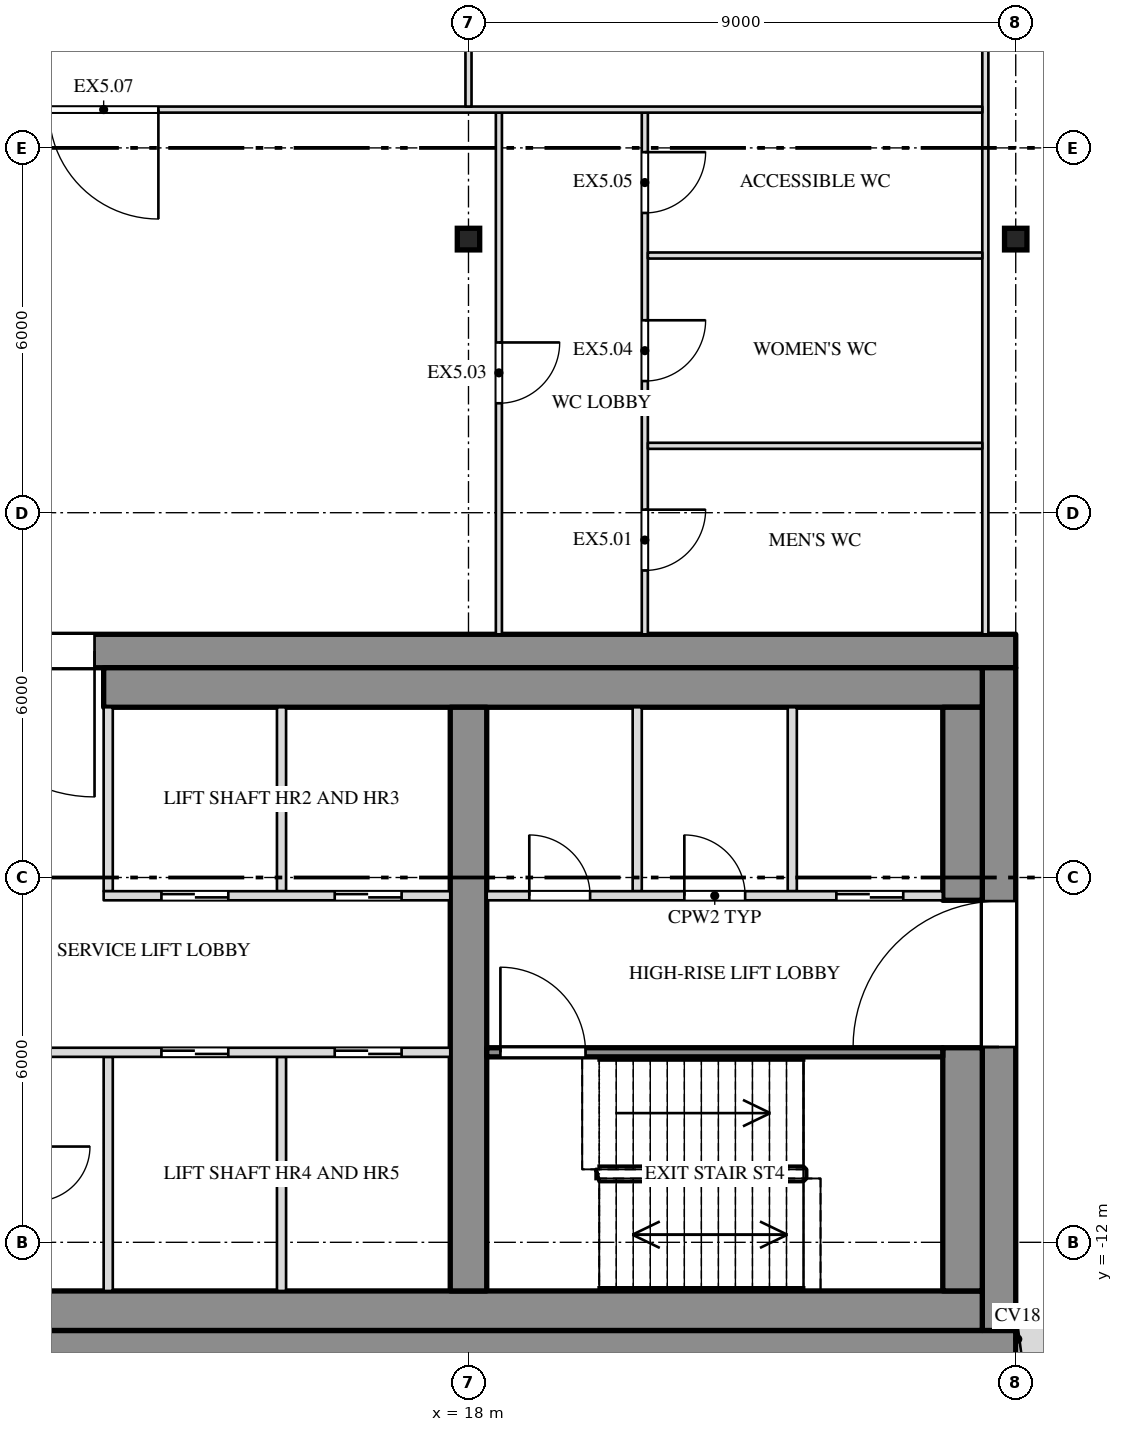
"""IFC4 building model, lengths in metres.
Left out: names, types, materials, properties, quantities, classifications, styles, units other than length and angle.
Written with IfcOpenShell. Run it as: python <this file> out.ifc"""

import sys

from ifc_helpers import new_model, si_unit, direction, frame, frame_2d, origin, origin_2d, place, context, subcontext, project, spatial, rectangle, i_section, extrude, element, fill, save


model = new_model("IFC4")
c1 = context("Model", 3, precision=1e-05, world=origin(), true_north=direction((0.0, 1.0)))
c2 = subcontext(c1, "Body", "Model", "MODEL_VIEW")
j1 = project(units=[si_unit("LENGTHUNIT", "METRE"), si_unit("PLANEANGLEUNIT", "RADIAN")], contexts=[c1])
p1 = place(None, origin())
s1 = spatial("IfcSite", under=j1, at=p1, CompositionType="ELEMENT")
p2 = place(p1, origin())
s2 = spatial("IfcBuilding", under=s1, at=p2, CompositionType="ELEMENT")
p3 = place(p2, frame((0.0, 0.0, 288.5)))
s3 = spatial("IfcBuildingStorey", under=s2, at=p3, CompositionType="ELEMENT", Elevation=288.5)
for number, where, z_axis, x_axis in (
    (1, (18.0, 4.5, 0.0), (0.0, 0.0, 1.0), (1.0, 0.0, 0.0)),
    (2, (27.0, 4.5, 0.0), (0.0, 0.0, 1.0), (1.0, 0.0, 0.0)),
):
    element("IfcColumn", number, at=place(p3, frame(where, z_axis=z_axis, x_axis=x_axis)), inside=s3, PredefinedType="COLUMN", context=c2, shape_type="SweptSolid", body=[
        extrude(i_section(OverallWidth=0.368, OverallDepth=0.356, WebThickness=0.011, FlangeThickness=0.018, at=origin_2d()), origin(), (0.0, 0.0, 1.0), 4.0),
    ])
p4 = place(p3, frame((-27.0, -2.275, 0.0), z_axis=(0.0, 0.0, 1.0), x_axis=(1.0, 0.0, 0.0)))
e3 = element("IfcWall", 3, at=p4, inside=s3, PredefinedType="SHEAR", context=c2, shape_type="SweptSolid", body=[
    extrude(rectangle(XDim=54.0, YDim=0.55, at=frame_2d((27.0, 0.0))), origin(), (0.0, 0.0, 1.0), 3.78),
])
p5 = place(p4, frame((15.15, 0.0, 0.0)))
e4 = element("IfcOpeningElement", 4, at=p5, cuts=e3, PredefinedType="OPENING", context=c2, shape_type="SweptSolid", body=[
    extrude(rectangle(XDim=2.4, YDim=2.1, at=frame_2d((1.2, 1.05))), frame((0.0, 0.287, 0.0), z_axis=(0.0, -1.0, 0.0), x_axis=(1.0, 0.0, 0.0)), (0.0, 0.0, 1.0), 0.574),
])
p6 = place(p4, frame((36.45, 0.0, 0.0)))
e5 = element("IfcOpeningElement", 5, at=p6, cuts=e3, PredefinedType="OPENING", context=c2, shape_type="SweptSolid", body=[
    extrude(rectangle(XDim=2.4, YDim=2.1, at=frame_2d((1.2, 1.05))), frame((0.0, 0.287, 0.0), z_axis=(0.0, -1.0, 0.0), x_axis=(1.0, 0.0, 0.0)), (0.0, 0.0, 1.0), 0.574),
])
p7 = place(p3, frame((-27.0, -13.725, 0.0), z_axis=(0.0, 0.0, 1.0), x_axis=(1.0, 0.0, 0.0)))
e6 = element("IfcWall", 6, at=p7, inside=s3, PredefinedType="SHEAR", context=c2, shape_type="SweptSolid", body=[
    extrude(rectangle(XDim=54.0, YDim=0.55, at=frame_2d((27.0, 0.0))), origin(), (0.0, 0.0, 1.0), 3.78),
])
p8 = place(p3, frame((26.725, -13.45, 0.0), z_axis=(0.0, 0.0, 1.0), x_axis=(0.0, 1.0, 0.0)))
e7 = element("IfcWall", 7, at=p8, inside=s3, PredefinedType="SHEAR", context=c2, shape_type="SweptSolid", body=[
    extrude(rectangle(XDim=10.9, YDim=0.55, at=frame_2d((5.45, 0.0))), origin(), (0.0, 0.0, 1.0), 3.78),
])
p9 = place(p8, frame((4.662, 0.0, 0.0)))
e8 = element("IfcOpeningElement", 8, at=p9, cuts=e7, PredefinedType="OPENING", context=c2, shape_type="SweptSolid", body=[
    extrude(rectangle(XDim=2.4, YDim=2.1, at=frame_2d((1.2, 1.05))), frame((0.0, 0.287, 0.0), z_axis=(0.0, -1.0, 0.0), x_axis=(1.0, 0.0, 0.0)), (0.0, 0.0, 1.0), 0.574),
])
p10 = place(p3, frame((12.0, -2.875, 0.0), z_axis=(0.0, 0.0, 1.0), x_axis=(1.0, 0.0, 0.0)))
e9 = element("IfcWall", 9, at=p10, inside=s3, PredefinedType="SHEAR", context=c2, shape_type="SweptSolid", body=[
    extrude(rectangle(XDim=14.45, YDim=0.65, at=frame_2d((7.225, 0.0))), origin(), (0.0, 0.0, 1.0), 3.78),
])
p11 = place(p3, frame((-26.45, -13.125, 0.0), z_axis=(0.0, 0.0, 1.0), x_axis=(1.0, 0.0, 0.0)))
e10 = element("IfcWall", 10, at=p11, inside=s3, PredefinedType="SHEAR", context=c2, shape_type="SweptSolid", body=[
    extrude(rectangle(XDim=52.9, YDim=0.65, at=frame_2d((26.45, 0.0))), origin(), (0.0, 0.0, 1.0), 3.78),
])
p12 = place(p3, frame((26.125, -12.8, 0.0), z_axis=(0.0, 0.0, 1.0), x_axis=(0.0, 1.0, 0.0)))
e11 = element("IfcWall", 11, at=p12, inside=s3, PredefinedType="SHEAR", context=c2, shape_type="SweptSolid", body=[
    extrude(rectangle(XDim=4.0, YDim=0.65, at=frame_2d((2.0, 0.0))), origin(), (0.0, 0.0, 1.0), 3.78),
])
p13 = place(p3, frame((26.125, -6.375, 0.0), z_axis=(0.0, 0.0, 1.0), x_axis=(0.0, 1.0, 0.0)))
e12 = element("IfcWall", 12, at=p13, inside=s3, PredefinedType="SHEAR", context=c2, shape_type="SweptSolid", body=[
    extrude(rectangle(XDim=3.175, YDim=0.65, at=frame_2d((1.587, 0.0))), origin(), (0.0, 0.0, 1.0), 3.78),
])
p14 = place(p3, frame((18.0, -12.8, 0.0), z_axis=(0.0, 0.0, 1.0), x_axis=(0.0, 1.0, 0.0)))
e13 = element("IfcWall", 13, at=p14, inside=s3, PredefinedType="SHEAR", context=c2, shape_type="SweptSolid", body=[
    extrude(rectangle(XDim=9.6, YDim=0.6, at=frame_2d((4.8, 0.0))), origin(), (0.0, 0.0, 1.0), 3.78),
])
p15 = place(p3, frame((18.5, -2.0, 0.0), z_axis=(0.0, 0.0, 1.0), x_axis=(0.0, 1.0, 0.0)))
e14 = element("IfcWall", 14, at=p15, inside=s3, PredefinedType="PARTITIONING", context=c2, shape_type="SweptSolid", body=[
    extrude(rectangle(XDim=8.58, YDim=0.1, at=frame_2d((4.29, 0.0))), origin(), (0.0, 0.0, 1.0), 3.78),
])
p16 = place(p15, frame((3.8, 0.0, 0.0)))
e15 = element("IfcOpeningElement", 15, at=p16, cuts=e14, PredefinedType="OPENING", context=c2, shape_type="SweptSolid", body=[
    extrude(rectangle(XDim=1.0, YDim=2.1, at=frame_2d((0.5, 1.05))), frame((0.0, 0.062, 0.0), z_axis=(0.0, -1.0, 0.0), x_axis=(1.0, 0.0, 0.0)), (0.0, 0.0, 1.0), 0.124),
])
p17 = place(p3, frame((20.9, -2.0, 0.0), z_axis=(0.0, 0.0, 1.0), x_axis=(0.0, 1.0, 0.0)))
e16 = element("IfcWall", 16, at=p17, inside=s3, PredefinedType="PARTITIONING", context=c2, shape_type="SweptSolid", body=[
    extrude(rectangle(XDim=8.58, YDim=0.1, at=frame_2d((4.29, 0.0))), origin(), (0.0, 0.0, 1.0), 3.78),
])
p18 = place(p17, frame((1.05, 0.0, 0.0)))
e17 = element("IfcOpeningElement", 17, at=p18, cuts=e16, PredefinedType="OPENING", context=c2, shape_type="SweptSolid", body=[
    extrude(rectangle(XDim=1.0, YDim=2.1, at=frame_2d((0.5, 1.05))), frame((0.0, 0.062, 0.0), z_axis=(0.0, -1.0, 0.0), x_axis=(1.0, 0.0, 0.0)), (0.0, 0.0, 1.0), 0.124),
])
p19 = place(p17, frame((4.165, 0.0, 0.0)))
e18 = element("IfcOpeningElement", 18, at=p19, cuts=e16, PredefinedType="OPENING", context=c2, shape_type="SweptSolid", body=[
    extrude(rectangle(XDim=1.0, YDim=2.1, at=frame_2d((0.5, 1.05))), frame((0.0, 0.062, 0.0), z_axis=(0.0, -1.0, 0.0), x_axis=(1.0, 0.0, 0.0)), (0.0, 0.0, 1.0), 0.124),
])
p20 = place(p17, frame((6.93, 0.0, 0.0)))
e19 = element("IfcOpeningElement", 19, at=p20, cuts=e16, PredefinedType="OPENING", context=c2, shape_type="SweptSolid", body=[
    extrude(rectangle(XDim=1.0, YDim=2.1, at=frame_2d((0.5, 1.05))), frame((0.0, 0.062, 0.0), z_axis=(0.0, -1.0, 0.0), x_axis=(1.0, 0.0, 0.0)), (0.0, 0.0, 1.0), 0.124),
])
p21 = place(p3, frame((26.5, -2.0, 0.0), z_axis=(0.0, 0.0, 1.0), x_axis=(0.0, 1.0, 0.0)))
e20 = element("IfcWall", 20, at=p21, inside=s3, PredefinedType="PARTITIONING", context=c2, shape_type="SweptSolid", body=[
    extrude(rectangle(XDim=23.19, YDim=0.1, at=frame_2d((11.595, 0.0))), origin(), (0.0, 0.0, 1.0), 3.78),
])
for number, where, z_axis, x_axis in (
    (21, (20.95, 1.1, 0.0), (0.0, 0.0, 1.0), (1.0, 0.0, 0.0)),
    (22, (20.95, 4.23, 0.0), (0.0, 0.0, 1.0), (1.0, 0.0, 0.0)),
):
    element("IfcWall", number, at=place(p3, frame(where, z_axis=z_axis, x_axis=x_axis)), inside=s3, PredefinedType="PARTITIONING", context=c2, shape_type="SweptSolid", body=[
        extrude(rectangle(XDim=5.5, YDim=0.1, at=frame_2d((2.75, 0.0))), origin(), (0.0, 0.0, 1.0), 3.78),
    ])
p22 = place(p3, frame((5.95, 6.63, 0.0), z_axis=(0.0, 0.0, 1.0), x_axis=(1.0, 0.0, 0.0)))
e23 = element("IfcWall", 23, at=p22, inside=s3, PredefinedType="PARTITIONING", context=c2, shape_type="SweptSolid", body=[
    extrude(rectangle(XDim=20.5, YDim=0.1, at=frame_2d((10.25, 0.0))), origin(), (0.0, 0.0, 1.0), 3.78),
])
p23 = place(p22, frame((5.15, 0.0, 0.0)))
e24 = element("IfcOpeningElement", 24, at=p23, cuts=e23, PredefinedType="OPENING", context=c2, shape_type="SweptSolid", body=[
    extrude(rectangle(XDim=1.8, YDim=2.1, at=frame_2d((0.9, 1.05))), frame((0.0, 0.062, 0.0), z_axis=(0.0, -1.0, 0.0), x_axis=(1.0, 0.0, 0.0)), (0.0, 0.0, 1.0), 0.124),
])
p24 = place(p3, frame((18.0, 6.68, 0.0), z_axis=(0.0, 0.0, 1.0), x_axis=(0.0, 1.0, 0.0)))
e25 = element("IfcWall", 25, at=p24, inside=s3, PredefinedType="PARTITIONING", context=c2, shape_type="SweptSolid", body=[
    extrude(rectangle(XDim=7.142, YDim=0.1, at=frame_2d((3.571, 0.0))), origin(), (0.0, 0.0, 1.0), 3.247),
])
p25 = place(p3, frame((27.059, -13.589, 0.0), z_axis=(0.0, 0.0, 1.0), x_axis=(0.991443199569, 0.13053881426, 0.0)))
e26 = element("IfcWall", 26, at=p25, inside=s3, PredefinedType="SOLIDWALL", context=c2, shape_type="SweptSolid", body=[
    extrude(rectangle(XDim=1.348, YDim=0.8, at=frame_2d((0.674, 0.0))), origin(), (0.0, 0.0, 1.0), 3.78),
])
for number, where, z_axis, x_axis in (
    (27, (12.075, -6.225, 0.0), (0.0, 0.0, 1.0), (0.0, 1.0, 0.0)),
    (28, (14.925, -6.225, 0.0), (0.0, 0.0, 1.0), (0.0, 1.0, 0.0)),
    (29, (20.775, -6.225, 0.0), (0.0, 0.0, 1.0), (0.0, 1.0, 0.0)),
    (30, (23.325, -6.225, 0.0), (0.0, 0.0, 1.0), (0.0, 1.0, 0.0)),
):
    element("IfcWall", number, at=place(p3, frame(where, z_axis=z_axis, x_axis=x_axis)), inside=s3, PredefinedType="PARTITIONING", context=c2, shape_type="SweptSolid", body=[
        extrude(rectangle(XDim=3.025, YDim=0.15, at=frame_2d((1.513, 0.0))), origin(), (0.0, 0.0, 1.0), 3.78),
    ])
for number, where, z_axis, x_axis in (
    (31, (12.075, -12.8, 0.0), (0.0, 0.0, 1.0), (0.0, 1.0, 0.0)),
    (32, (14.925, -12.8, 0.0), (0.0, 0.0, 1.0), (0.0, 1.0, 0.0)),
):
    element("IfcWall", number, at=place(p3, frame(where, z_axis=z_axis, x_axis=x_axis)), inside=s3, PredefinedType="PARTITIONING", context=c2, shape_type="SweptSolid", body=[
        extrude(rectangle(XDim=3.85, YDim=0.15, at=frame_2d((1.925, 0.0))), origin(), (0.0, 0.0, 1.0), 3.78),
    ])
p26 = place(p3, frame((12.0, -6.3, 0.0), z_axis=(0.0, 0.0, 1.0), x_axis=(1.0, 0.0, 0.0)))
e33 = element("IfcWall", 33, at=p26, inside=s3, PredefinedType="PARTITIONING", context=c2, shape_type="SweptSolid", body=[
    extrude(rectangle(XDim=5.7, YDim=0.15, at=frame_2d((2.85, 0.0))), origin(), (0.0, 0.0, 1.0), 3.78),
])
p27 = place(p26, frame((0.95, 0.0, 0.0)))
e34 = element("IfcOpeningElement", 34, at=p27, cuts=e33, PredefinedType="OPENING", context=c2, shape_type="SweptSolid", body=[
    extrude(rectangle(XDim=1.1, YDim=2.1, at=frame_2d((0.55, 1.05))), frame((0.0, 0.087, 0.0), z_axis=(0.0, -1.0, 0.0), x_axis=(1.0, 0.0, 0.0)), (0.0, 0.0, 1.0), 0.174),
])
p28 = place(p26, frame((3.8, 0.0, 0.0)))
e35 = element("IfcOpeningElement", 35, at=p28, cuts=e33, PredefinedType="OPENING", context=c2, shape_type="SweptSolid", body=[
    extrude(rectangle(XDim=1.1, YDim=2.1, at=frame_2d((0.55, 1.05))), frame((0.0, 0.087, 0.0), z_axis=(0.0, -1.0, 0.0), x_axis=(1.0, 0.0, 0.0)), (0.0, 0.0, 1.0), 0.174),
])
p29 = place(p3, frame((18.3, -6.3, 0.0), z_axis=(0.0, 0.0, 1.0), x_axis=(1.0, 0.0, 0.0)))
e36 = element("IfcWall", 36, at=p29, inside=s3, PredefinedType="PARTITIONING", context=c2, shape_type="SweptSolid", body=[
    extrude(rectangle(XDim=7.5, YDim=0.15, at=frame_2d((3.75, 0.0))), origin(), (0.0, 0.0, 1.0), 3.78),
])
p30 = place(p29, frame((0.7, 0.0, 0.0)))
e37 = element("IfcOpeningElement", 37, at=p30, cuts=e36, PredefinedType="OPENING", context=c2, shape_type="SweptSolid", body=[
    extrude(rectangle(XDim=1.0, YDim=2.1, at=frame_2d((0.5, 1.05))), frame((0.0, 0.087, 0.0), z_axis=(0.0, -1.0, 0.0), x_axis=(1.0, 0.0, 0.0)), (0.0, 0.0, 1.0), 0.174),
])
p31 = place(p29, frame((3.25, 0.0, 0.0)))
e38 = element("IfcOpeningElement", 38, at=p31, cuts=e36, PredefinedType="OPENING", context=c2, shape_type="SweptSolid", body=[
    extrude(rectangle(XDim=1.0, YDim=2.1, at=frame_2d((0.5, 1.05))), frame((0.0, 0.087, 0.0), z_axis=(0.0, -1.0, 0.0), x_axis=(1.0, 0.0, 0.0)), (0.0, 0.0, 1.0), 0.174),
])
p32 = place(p29, frame((5.75, 0.0, 0.0)))
e39 = element("IfcOpeningElement", 39, at=p32, cuts=e36, PredefinedType="OPENING", context=c2, shape_type="SweptSolid", body=[
    extrude(rectangle(XDim=1.1, YDim=2.1, at=frame_2d((0.55, 1.05))), frame((0.0, 0.087, 0.0), z_axis=(0.0, -1.0, 0.0), x_axis=(1.0, 0.0, 0.0)), (0.0, 0.0, 1.0), 0.174),
])
p33 = place(p3, frame((10.8, -8.875, 0.0), z_axis=(0.0, 0.0, 1.0), x_axis=(1.0, 0.0, 0.0)))
e40 = element("IfcWall", 40, at=p33, inside=s3, PredefinedType="PARTITIONING", context=c2, shape_type="SweptSolid", body=[
    extrude(rectangle(XDim=6.9, YDim=0.15, at=frame_2d((3.45, 0.0))), origin(), (0.0, 0.0, 1.0), 3.78),
])
p34 = place(p33, frame((2.15, 0.0, 0.0)))
e41 = element("IfcOpeningElement", 41, at=p34, cuts=e40, PredefinedType="OPENING", context=c2, shape_type="SweptSolid", body=[
    extrude(rectangle(XDim=1.1, YDim=2.1, at=frame_2d((0.55, 1.05))), frame((0.0, 0.087, 0.0), z_axis=(0.0, -1.0, 0.0), x_axis=(1.0, 0.0, 0.0)), (0.0, 0.0, 1.0), 0.174),
])
p35 = place(p33, frame((5.0, 0.0, 0.0)))
e42 = element("IfcOpeningElement", 42, at=p35, cuts=e40, PredefinedType="OPENING", context=c2, shape_type="SweptSolid", body=[
    extrude(rectangle(XDim=1.1, YDim=2.1, at=frame_2d((0.55, 1.05))), frame((0.0, 0.087, 0.0), z_axis=(0.0, -1.0, 0.0), x_axis=(1.0, 0.0, 0.0)), (0.0, 0.0, 1.0), 0.174),
])
p36 = place(p3, frame((18.3, -8.875, 0.0), z_axis=(0.0, 0.0, 1.0), x_axis=(1.0, 0.0, 0.0)))
e43 = element("IfcWall", 43, at=p36, inside=s3, PredefinedType="SHEAR", context=c2, shape_type="SweptSolid", body=[
    extrude(rectangle(XDim=7.5, YDim=0.15, at=frame_2d((3.75, 0.0))), origin(), (0.0, 0.0, 1.0), 3.78),
])
p37 = place(p36, frame((0.225, 0.0, 0.0)))
e44 = element("IfcOpeningElement", 44, at=p37, cuts=e43, PredefinedType="OPENING", context=c2, shape_type="SweptSolid", body=[
    extrude(rectangle(XDim=1.4, YDim=2.1, at=frame_2d((0.7, 1.05))), frame((0.0, 0.087, 0.0), z_axis=(0.0, -1.0, 0.0), x_axis=(1.0, 0.0, 0.0)), (0.0, 0.0, 1.0), 0.174),
])
p38 = place(p18, origin())
e45 = element("IfcDoor", 45, at=p38, inside=s3, OperationType="SINGLE_SWING_LEFT", PredefinedType="DOOR", context=c2, shape_type="SweptSolid", body=[
    extrude(rectangle(XDim=1.0, YDim=2.1, at=frame_2d((0.5, 1.05))), frame((0.0, 0.025, 0.0), z_axis=(0.0, -1.0, 0.0), x_axis=(1.0, 0.0, 0.0)), (0.0, 0.0, 1.0), 0.05),
])
fill(e17, e45)
p39 = place(p16, origin())
e46 = element("IfcDoor", 46, at=p39, inside=s3, OperationType="SINGLE_SWING_LEFT", PredefinedType="DOOR", context=c2, shape_type="SweptSolid", body=[
    extrude(rectangle(XDim=1.0, YDim=2.1, at=frame_2d((0.5, 1.05))), frame((0.0, 0.025, 0.0), z_axis=(0.0, -1.0, 0.0), x_axis=(1.0, 0.0, 0.0)), (0.0, 0.0, 1.0), 0.05),
])
fill(e15, e46)
p40 = place(p19, origin())
e47 = element("IfcDoor", 47, at=p40, inside=s3, OperationType="SINGLE_SWING_LEFT", PredefinedType="DOOR", context=c2, shape_type="SweptSolid", body=[
    extrude(rectangle(XDim=1.0, YDim=2.1, at=frame_2d((0.5, 1.05))), frame((0.0, 0.025, 0.0), z_axis=(0.0, -1.0, 0.0), x_axis=(1.0, 0.0, 0.0)), (0.0, 0.0, 1.0), 0.05),
])
fill(e18, e47)
p41 = place(p20, origin())
e48 = element("IfcDoor", 48, at=p41, inside=s3, OperationType="SINGLE_SWING_LEFT", PredefinedType="DOOR", context=c2, shape_type="SweptSolid", body=[
    extrude(rectangle(XDim=1.0, YDim=2.1, at=frame_2d((0.5, 1.05))), frame((0.0, 0.025, 0.0), z_axis=(0.0, -1.0, 0.0), x_axis=(1.0, 0.0, 0.0)), (0.0, 0.0, 1.0), 0.05),
])
fill(e19, e48)
p42 = place(p23, origin())
e49 = element("IfcDoor", 49, at=p42, inside=s3, OperationType="DOUBLE_DOOR_SINGLE_SWING", PredefinedType="DOOR", context=c2, shape_type="SweptSolid", body=[
    extrude(rectangle(XDim=1.8, YDim=2.1, at=frame_2d((0.9, 1.05))), frame((0.0, 0.025, 0.0), z_axis=(0.0, -1.0, 0.0), x_axis=(1.0, 0.0, 0.0)), (0.0, 0.0, 1.0), 0.05),
])
fill(e24, e49)
p43 = place(p6, origin())
e50 = element("IfcDoor", 50, at=p43, inside=s3, OperationType="DOUBLE_DOOR_SINGLE_SWING", PredefinedType="DOOR", context=c2, shape_type="SweptSolid", body=[
    extrude(rectangle(XDim=2.4, YDim=2.1, at=frame_2d((1.2, 1.05))), frame((0.0, 0.025, 0.0), z_axis=(0.0, -1.0, 0.0), x_axis=(1.0, 0.0, 0.0)), (0.0, 0.0, 1.0), 0.05),
])
fill(e5, e50)
p44 = place(p34, origin())
e51 = element("IfcDoor", 51, at=p44, inside=s3, OperationType="SLIDING_TO_RIGHT", PredefinedType="DOOR", context=c2, shape_type="SweptSolid", body=[
    extrude(rectangle(XDim=1.1, YDim=2.1, at=frame_2d((0.55, 1.05))), frame((0.0, 0.025, 0.0), z_axis=(0.0, -1.0, 0.0), x_axis=(1.0, 0.0, 0.0)), (0.0, 0.0, 1.0), 0.05),
])
fill(e41, e51)
p45 = place(p27, origin())
e52 = element("IfcDoor", 52, at=p45, inside=s3, OperationType="SLIDING_TO_LEFT", PredefinedType="DOOR", context=c2, shape_type="SweptSolid", body=[
    extrude(rectangle(XDim=1.1, YDim=2.1, at=frame_2d((0.55, 1.05))), frame((0.0, 0.025, 0.0), z_axis=(0.0, -1.0, 0.0), x_axis=(1.0, 0.0, 0.0)), (0.0, 0.0, 1.0), 0.05),
])
fill(e34, e52)
p46 = place(p35, origin())
e53 = element("IfcDoor", 53, at=p46, inside=s3, OperationType="SLIDING_TO_RIGHT", PredefinedType="DOOR", context=c2, shape_type="SweptSolid", body=[
    extrude(rectangle(XDim=1.1, YDim=2.1, at=frame_2d((0.55, 1.05))), frame((0.0, 0.025, 0.0), z_axis=(0.0, -1.0, 0.0), x_axis=(1.0, 0.0, 0.0)), (0.0, 0.0, 1.0), 0.05),
])
fill(e42, e53)
p47 = place(p28, origin())
e54 = element("IfcDoor", 54, at=p47, inside=s3, OperationType="SLIDING_TO_LEFT", PredefinedType="DOOR", context=c2, shape_type="SweptSolid", body=[
    extrude(rectangle(XDim=1.1, YDim=2.1, at=frame_2d((0.55, 1.05))), frame((0.0, 0.025, 0.0), z_axis=(0.0, -1.0, 0.0), x_axis=(1.0, 0.0, 0.0)), (0.0, 0.0, 1.0), 0.05),
])
fill(e35, e54)
p48 = place(p37, origin())
e55 = element("IfcDoor", 55, at=p48, inside=s3, OperationType="DOUBLE_DOOR_SINGLE_SWING", PredefinedType="DOOR", context=c2, shape_type="SweptSolid", body=[
    extrude(rectangle(XDim=1.4, YDim=2.1, at=frame_2d((0.7, 1.05))), frame((0.0, 0.025, 0.0), z_axis=(0.0, -1.0, 0.0), x_axis=(1.0, 0.0, 0.0)), (0.0, 0.0, 1.0), 0.05),
])
fill(e44, e55)
p49 = place(p30, origin())
e56 = element("IfcDoor", 56, at=p49, inside=s3, OperationType="SINGLE_SWING_LEFT", PredefinedType="DOOR", context=c2, shape_type="SweptSolid", body=[
    extrude(rectangle(XDim=1.0, YDim=2.1, at=frame_2d((0.5, 1.05))), frame((0.0, 0.025, 0.0), z_axis=(0.0, -1.0, 0.0), x_axis=(1.0, 0.0, 0.0)), (0.0, 0.0, 1.0), 0.05),
])
fill(e37, e56)
p50 = place(p31, origin())
e57 = element("IfcDoor", 57, at=p50, inside=s3, OperationType="SINGLE_SWING_LEFT", PredefinedType="DOOR", context=c2, shape_type="SweptSolid", body=[
    extrude(rectangle(XDim=1.0, YDim=2.1, at=frame_2d((0.5, 1.05))), frame((0.0, 0.025, 0.0), z_axis=(0.0, -1.0, 0.0), x_axis=(1.0, 0.0, 0.0)), (0.0, 0.0, 1.0), 0.05),
])
fill(e38, e57)
p51 = place(p32, origin())
e58 = element("IfcDoor", 58, at=p51, inside=s3, OperationType="SLIDING_TO_LEFT", PredefinedType="DOOR", context=c2, shape_type="SweptSolid", body=[
    extrude(rectangle(XDim=1.1, YDim=2.1, at=frame_2d((0.55, 1.05))), frame((0.0, 0.025, 0.0), z_axis=(0.0, -1.0, 0.0), x_axis=(1.0, 0.0, 0.0)), (0.0, 0.0, 1.0), 0.05),
])
fill(e39, e58)
p52 = place(p9, origin())
e59 = element("IfcDoor", 59, at=p52, inside=s3, OperationType="DOUBLE_DOOR_SINGLE_SWING", PredefinedType="DOOR", context=c2, shape_type="SweptSolid", body=[
    extrude(rectangle(XDim=2.4, YDim=2.1, at=frame_2d((1.2, 1.05))), frame((0.0, 0.025, 0.0), z_axis=(0.0, -1.0, 0.0), x_axis=(1.0, 0.0, 0.0)), (0.0, 0.0, 1.0), 0.05),
])
fill(e8, e59)
save(model, sys.argv[1])
